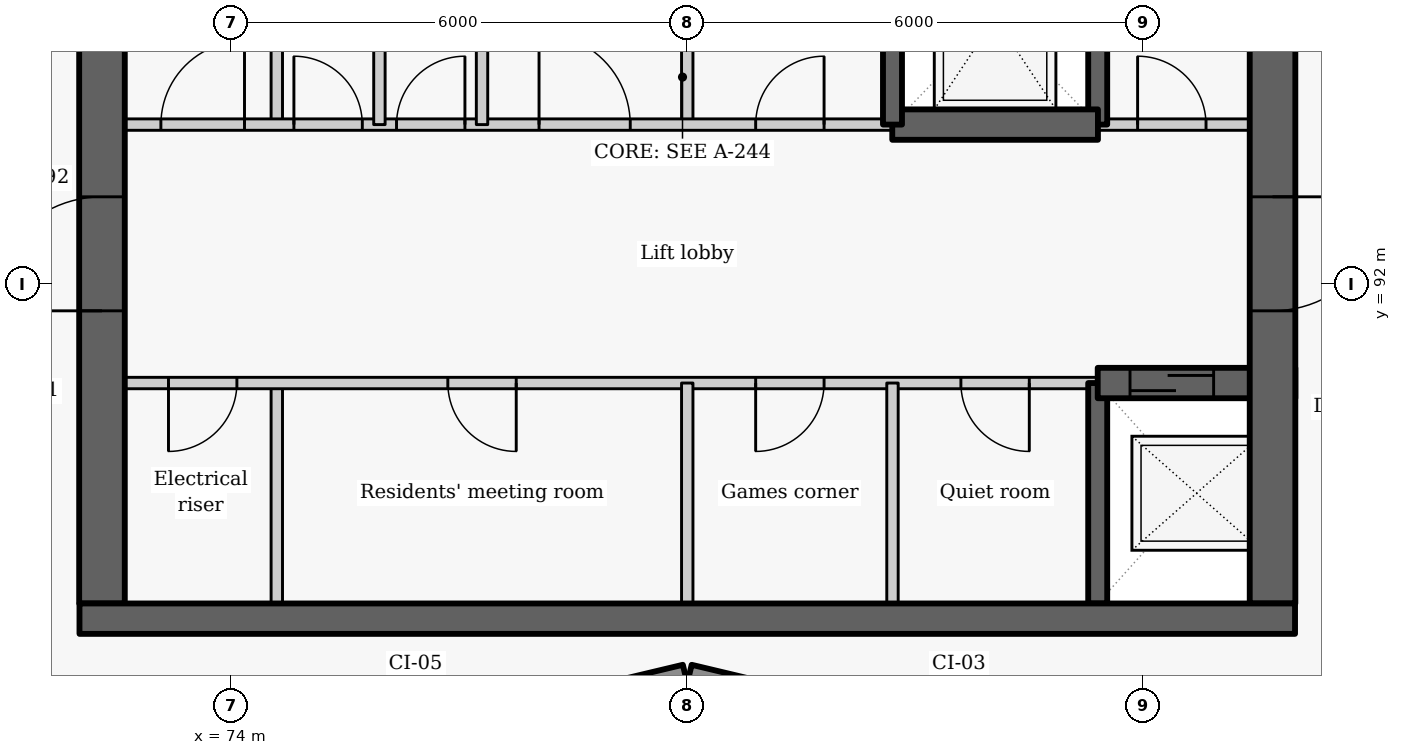
"""IFC4 building model, lengths in metres.
Left out: names, types, materials, properties, quantities, classifications, styles, units other than length and angle.
Written with IfcOpenShell. Run it as: python <this file> out.ifc"""

import sys

from ifc_helpers import new_model, si_unit, direction, frame, frame_2d, origin, place, context, subcontext, project, spatial, rectangle, extrude, element, fill, save


model = new_model("IFC4")
c1 = context("Model", 3, precision=1e-05, world=origin(), true_north=direction((0.0, 1.0)))
c2 = subcontext(c1, "Body", "Model", "MODEL_VIEW")
j1 = project(units=[si_unit("LENGTHUNIT", "METRE"), si_unit("PLANEANGLEUNIT", "RADIAN")], contexts=[c1])
p1 = place(None, origin())
s1 = spatial("IfcSite", under=j1, at=p1, CompositionType="ELEMENT")
p2 = place(p1, origin())
s2 = spatial("IfcBuilding", under=s1, at=p2, CompositionType="ELEMENT")
p3 = place(p2, frame((0.0, 0.0, 269.1)))
s3 = spatial("IfcBuildingStorey", under=s2, at=p3, CompositionType="ELEMENT", Elevation=269.1)
for number, where, z_axis, x_axis in (
    (1, (76.814, 86.119, 0.0), (0.0, 0.0, 1.0), (0.973, 0.232, 0.0)),
    (2, (80.029, 86.872, 0.0), (0.0, 0.0, 1.0), (0.973, -0.232, 0.0)),
):
    element("IfcWall", number, at=place(p3, frame(where, z_axis=z_axis, x_axis=x_axis)), inside=s3, PredefinedType="SOLIDWALL", context=c2, shape_type="SweptSolid", body=[
        extrude(rectangle(XDim=3.246, YDim=0.25, at=frame_2d((1.623, 0.0))), origin(), (0.0, 0.0, 1.0), 2.125),
    ])
p4 = place(p3, frame((74.6, 87.8, 0.0), z_axis=(0.0, 0.0, 1.0), x_axis=(0.0, 1.0, 0.0)))
e3 = element("IfcWall", 3, at=p4, inside=s3, PredefinedType="PARTITIONING", context=c2, shape_type="SweptSolid", body=[
    extrude(rectangle(XDim=2.9, YDim=0.15, at=frame_2d((1.45, 0.0))), origin(), (0.0, 0.0, 1.0), 3.025),
])
p5 = place(p3, frame((74.6, 94.1, 0.0), z_axis=(0.0, 0.0, 1.0), x_axis=(0.0, 1.0, 0.0)))
e4 = element("IfcWall", 4, at=p5, inside=s3, PredefinedType="PARTITIONING", context=c2, shape_type="SweptSolid", body=[
    extrude(rectangle(XDim=2.8, YDim=0.15, at=frame_2d((1.4, 0.0))), origin(), (0.0, 0.0, 1.0), 3.025),
])
p6 = place(p3, frame((85.4, 90.7, 0.0), z_axis=(0.0, 0.0, 1.0), x_axis=(-1.0, 0.0, 0.0)))
e5 = element("IfcWall", 5, at=p6, inside=s3, PredefinedType="PARTITIONING", context=c2, shape_type="SweptSolid", body=[
    extrude(rectangle(XDim=13.4, YDim=0.15, at=frame_2d((6.7, 0.0))), origin(), (0.0, 0.0, 1.0), 3.025),
])
p7 = place(p6, frame((11.325, 0.0, 0.0)))
e6 = element("IfcOpeningElement", 6, at=p7, cuts=e5, PredefinedType="OPENING", context=c2, shape_type="SweptSolid", body=[
    extrude(rectangle(XDim=0.9, YDim=2.1, at=frame_2d((0.45, 1.05))), frame((0.0, 0.085, 0.0), z_axis=(0.0, -1.0, 0.0), x_axis=(1.0, 0.0, 0.0)), (0.0, 0.0, 1.0), 0.17),
])
p8 = place(p6, frame((7.65, 0.0, 0.0)))
e7 = element("IfcOpeningElement", 7, at=p8, cuts=e5, PredefinedType="OPENING", context=c2, shape_type="SweptSolid", body=[
    extrude(rectangle(XDim=0.9, YDim=2.1, at=frame_2d((0.45, 1.05))), frame((0.0, 0.085, 0.0), z_axis=(0.0, -1.0, 0.0), x_axis=(1.0, 0.0, 0.0)), (0.0, 0.0, 1.0), 0.17),
])
p9 = place(p6, frame((3.6, 0.0, 0.0)))
e8 = element("IfcOpeningElement", 8, at=p9, cuts=e5, PredefinedType="OPENING", context=c2, shape_type="SweptSolid", body=[
    extrude(rectangle(XDim=0.9, YDim=2.1, at=frame_2d((0.45, 1.05))), frame((0.0, 0.085, 0.0), z_axis=(0.0, -1.0, 0.0), x_axis=(1.0, 0.0, 0.0)), (0.0, 0.0, 1.0), 0.17),
])
p10 = place(p6, frame((0.9, 0.0, 0.0)))
e9 = element("IfcOpeningElement", 9, at=p10, cuts=e5, PredefinedType="OPENING", context=c2, shape_type="SweptSolid", body=[
    extrude(rectangle(XDim=0.9, YDim=2.1, at=frame_2d((0.45, 1.05))), frame((0.0, 0.085, 0.0), z_axis=(0.0, -1.0, 0.0), x_axis=(1.0, 0.0, 0.0)), (0.0, 0.0, 1.0), 0.17),
])
p11 = place(p3, frame((72.3, 87.8, -0.275), z_axis=(0.0, 0.0, 1.0), x_axis=(0.0, 1.0, 0.0)))
e10 = element("IfcWall", 10, at=p11, inside=s3, PredefinedType="SHEAR", context=c2, shape_type="SweptSolid", body=[
    extrude(rectangle(XDim=9.1, YDim=0.6, at=frame_2d((4.55, 0.0))), origin(), (0.0, 0.0, 1.0), 3.3),
])
p12 = place(p11, frame((3.85, 0.0, 0.275)))
e11 = element("IfcOpeningElement", 11, at=p12, cuts=e10, PredefinedType="OPENING", context=c2, shape_type="SweptSolid", body=[
    extrude(rectangle(XDim=1.5, YDim=2.1, at=frame_2d((0.75, 1.05))), frame((0.0, 0.31, 0.0), z_axis=(0.0, -1.0, 0.0), x_axis=(1.0, 0.0, 0.0)), (0.0, 0.0, 1.0), 0.62),
])
p13 = place(p3, frame((85.4, 87.8, -0.275), z_axis=(0.0, 0.0, 1.0), x_axis=(0.0, 1.0, 0.0)))
e12 = element("IfcWall", 12, at=p13, inside=s3, PredefinedType="SHEAR", context=c2, shape_type="SweptSolid", body=[
    extrude(rectangle(XDim=2.9, YDim=0.25, at=frame_2d((1.45, 0.0))), origin(), (0.0, 0.0, 1.0), 3.3),
])
p14 = place(p3, frame((85.4, 94.1, -0.275), z_axis=(0.0, 0.0, 1.0), x_axis=(0.0, 1.0, 0.0)))
e13 = element("IfcWall", 13, at=p14, inside=s3, PredefinedType="SHEAR", context=c2, shape_type="SweptSolid", body=[
    extrude(rectangle(XDim=2.8, YDim=0.25, at=frame_2d((1.4, 0.0))), origin(), (0.0, 0.0, 1.0), 3.3),
])
p15 = place(p3, frame((85.4, 90.7, -0.275), z_axis=(0.0, 0.0, 1.0), x_axis=(1.0, 0.0, 0.0)))
e14 = element("IfcWall", 14, at=p15, inside=s3, PredefinedType="SHEAR", context=c2, shape_type="SweptSolid", body=[
    extrude(rectangle(XDim=2.6, YDim=0.4, at=frame_2d((1.3, 0.0))), origin(), (0.0, 0.0, 1.0), 3.3),
])
p16 = place(p15, frame((0.425, 0.0, 0.275)))
e15 = element("IfcOpeningElement", 15, at=p16, cuts=e14, PredefinedType="OPENING", context=c2, shape_type="SweptSolid", body=[
    extrude(rectangle(XDim=1.1, YDim=2.1, at=frame_2d((0.55, 1.05))), frame((0.0, 0.21, 0.0), z_axis=(0.0, -1.0, 0.0), x_axis=(1.0, 0.0, 0.0)), (0.0, 0.0, 1.0), 0.42),
])
p17 = place(p3, frame((87.7, 102.05, -0.275), z_axis=(0.0, 0.0, 1.0), x_axis=(0.0, -1.0, 0.0)))
e16 = element("IfcWall", 16, at=p17, inside=s3, PredefinedType="SHEAR", context=c2, shape_type="SweptSolid", body=[
    extrude(rectangle(XDim=14.25, YDim=0.6, at=frame_2d((7.125, 0.0))), origin(), (0.0, 0.0, 1.0), 3.3),
])
p18 = place(p17, frame((8.9, 0.0, 0.275)))
e17 = element("IfcOpeningElement", 17, at=p18, cuts=e16, PredefinedType="OPENING", context=c2, shape_type="SweptSolid", body=[
    extrude(rectangle(XDim=1.5, YDim=2.1, at=frame_2d((0.75, 1.05))), frame((0.0, 0.31, 0.0), z_axis=(0.0, -1.0, 0.0), x_axis=(1.0, 0.0, 0.0)), (0.0, 0.0, 1.0), 0.62),
])
p19 = place(p17, frame((2.025, 0.0, 0.275)))
e18 = element("IfcOpeningElement", 18, at=p19, cuts=e16, PredefinedType="OPENING", context=c2, shape_type="SweptSolid", body=[
    extrude(rectangle(XDim=1.1, YDim=2.1, at=frame_2d((0.55, 1.05))), frame((0.0, 0.31, 0.0), z_axis=(0.0, -1.0, 0.0), x_axis=(1.0, 0.0, 0.0)), (0.0, 0.0, 1.0), 0.62),
])
p20 = place(p3, frame((80.0, 87.8, 0.0), z_axis=(0.0, 0.0, 1.0), x_axis=(0.0, 1.0, 0.0)))
e19 = element("IfcWall", 19, at=p20, inside=s3, PredefinedType="PARTITIONING", context=c2, shape_type="SweptSolid", body=[
    extrude(rectangle(XDim=2.9, YDim=0.15, at=frame_2d((1.45, 0.0))), origin(), (0.0, 0.0, 1.0), 3.025),
])
p21 = place(p3, frame((80.0, 94.1, 0.0), z_axis=(0.0, 0.0, 1.0), x_axis=(0.0, 1.0, 0.0)))
e20 = element("IfcWall", 20, at=p21, inside=s3, PredefinedType="PARTITIONING", context=c2, shape_type="SweptSolid", body=[
    extrude(rectangle(XDim=2.8, YDim=0.15, at=frame_2d((1.4, 0.0))), origin(), (0.0, 0.0, 1.0), 3.025),
])
p22 = place(p3, frame((82.7, 87.8, 0.0), z_axis=(0.0, 0.0, 1.0), x_axis=(0.0, 1.0, 0.0)))
e21 = element("IfcWall", 21, at=p22, inside=s3, PredefinedType="PARTITIONING", context=c2, shape_type="SweptSolid", body=[
    extrude(rectangle(XDim=2.9, YDim=0.15, at=frame_2d((1.45, 0.0))), origin(), (0.0, 0.0, 1.0), 3.025),
])
p23 = place(p3, frame((72.0, 94.1, 0.0), z_axis=(0.0, 0.0, 1.0), x_axis=(1.0, 0.0, 0.0)))
e22 = element("IfcWall", 22, at=p23, inside=s3, PredefinedType="PARTITIONING", context=c2, shape_type="SweptSolid", body=[
    extrude(rectangle(XDim=10.703, YDim=0.15, at=frame_2d((5.352, 0.0))), origin(), (0.0, 0.0, 1.0), 3.025),
])
p24 = place(p23, frame((1.075, 0.0, 0.0)))
e23 = element("IfcOpeningElement", 23, at=p24, cuts=e22, PredefinedType="OPENING", context=c2, shape_type="SweptSolid", body=[
    extrude(rectangle(XDim=1.1, YDim=2.1, at=frame_2d((0.55, 1.05))), frame((0.0, 0.085, 0.0), z_axis=(0.0, -1.0, 0.0), x_axis=(1.0, 0.0, 0.0)), (0.0, 0.0, 1.0), 0.17),
])
p25 = place(p23, frame((2.825, 0.0, 0.0)))
e24 = element("IfcOpeningElement", 24, at=p25, cuts=e22, PredefinedType="OPENING", context=c2, shape_type="SweptSolid", body=[
    extrude(rectangle(XDim=0.9, YDim=2.1, at=frame_2d((0.45, 1.05))), frame((0.0, 0.085, 0.0), z_axis=(0.0, -1.0, 0.0), x_axis=(1.0, 0.0, 0.0)), (0.0, 0.0, 1.0), 0.17),
])
p26 = place(p23, frame((4.175, 0.0, 0.0)))
e25 = element("IfcOpeningElement", 25, at=p26, cuts=e22, PredefinedType="OPENING", context=c2, shape_type="SweptSolid", body=[
    extrude(rectangle(XDim=0.9, YDim=2.1, at=frame_2d((0.45, 1.05))), frame((0.0, 0.085, 0.0), z_axis=(0.0, -1.0, 0.0), x_axis=(1.0, 0.0, 0.0)), (0.0, 0.0, 1.0), 0.17),
])
p27 = place(p23, frame((6.05, 0.0, 0.0)))
e26 = element("IfcOpeningElement", 26, at=p27, cuts=e22, PredefinedType="OPENING", context=c2, shape_type="SweptSolid", body=[
    extrude(rectangle(XDim=1.2, YDim=2.1, at=frame_2d((0.6, 1.05))), frame((0.0, 0.085, 0.0), z_axis=(0.0, -1.0, 0.0), x_axis=(1.0, 0.0, 0.0)), (0.0, 0.0, 1.0), 0.17),
])
p28 = place(p23, frame((8.9, 0.0, 0.0)))
e27 = element("IfcOpeningElement", 27, at=p28, cuts=e22, PredefinedType="OPENING", context=c2, shape_type="SweptSolid", body=[
    extrude(rectangle(XDim=0.9, YDim=2.1, at=frame_2d((0.45, 1.05))), frame((0.0, 0.085, 0.0), z_axis=(0.0, -1.0, 0.0), x_axis=(1.0, 0.0, 0.0)), (0.0, 0.0, 1.0), 0.17),
])
p29 = place(p3, frame((85.397, 94.1, 0.0), z_axis=(0.0, 0.0, 1.0), x_axis=(1.0, 0.0, 0.0)))
e28 = element("IfcWall", 28, at=p29, inside=s3, PredefinedType="PARTITIONING", context=c2, shape_type="SweptSolid", body=[
    extrude(rectangle(XDim=2.603, YDim=0.15, at=frame_2d((1.302, 0.0))), origin(), (0.0, 0.0, 1.0), 3.025),
])
p30 = place(p29, frame((0.528, 0.0, 0.0)))
e29 = element("IfcOpeningElement", 29, at=p30, cuts=e28, PredefinedType="OPENING", context=c2, shape_type="SweptSolid", body=[
    extrude(rectangle(XDim=0.9, YDim=2.1, at=frame_2d((0.45, 1.05))), frame((0.0, 0.085, 0.0), z_axis=(0.0, -1.0, 0.0), x_axis=(1.0, 0.0, 0.0)), (0.0, 0.0, 1.0), 0.17),
])
p31 = place(p3, frame((82.697, 94.1, -0.275), z_axis=(0.0, 0.0, 1.0), x_axis=(1.0, 0.0, 0.0)))
e30 = element("IfcWall", 30, at=p31, inside=s3, PredefinedType="SHEAR", context=c2, shape_type="SweptSolid", body=[
    extrude(rectangle(XDim=2.706, YDim=0.4, at=frame_2d((1.353, 0.0))), origin(), (0.0, 0.0, 1.0), 3.3),
])
for number, where, z_axis, x_axis in (
    (31, (75.95, 94.1, 0.0), (0.0, 0.0, 1.0), (0.0, 1.0, 0.0)),
    (32, (77.3, 94.1, 0.0), (0.0, 0.0, 1.0), (0.0, 1.0, 0.0)),
):
    element("IfcWall", number, at=place(p3, frame(where, z_axis=z_axis, x_axis=x_axis)), inside=s3, PredefinedType="PARTITIONING", context=c2, shape_type="SweptSolid", body=[
        extrude(rectangle(XDim=2.8, YDim=0.15, at=frame_2d((1.4, 0.0))), origin(), (0.0, 0.0, 1.0), 3.025),
    ])
p32 = place(p3, frame((82.7, 94.1, -0.275), z_axis=(0.0, 0.0, 1.0), x_axis=(0.0, 1.0, 0.0)))
e33 = element("IfcWall", 33, at=p32, inside=s3, PredefinedType="SHEAR", context=c2, shape_type="SweptSolid", body=[
    extrude(rectangle(XDim=2.8, YDim=0.25, at=frame_2d((1.4, 0.0))), origin(), (0.0, 0.0, 1.0), 3.3),
])
p33 = place(p3, frame((72.004, 87.6, -0.275), z_axis=(0.0, 0.0, 1.0), x_axis=(1.0, 0.0, 0.0)))
e34 = element("IfcWall", 34, at=p33, inside=s3, PredefinedType="SHEAR", context=c2, shape_type="SweptSolid", body=[
    extrude(rectangle(XDim=15.992, YDim=0.4, at=frame_2d((7.996, 0.0))), origin(), (0.0, 0.0, 1.0), 3.3),
])
p34 = place(p7, origin())
e35 = element("IfcDoor", 35, at=p34, inside=s3, OperationType="SINGLE_SWING_RIGHT", PredefinedType="DOOR", context=c2, shape_type="SweptSolid", body=[
    extrude(rectangle(XDim=0.9, YDim=2.1, at=frame_2d((0.45, 1.05))), frame((0.0, 0.025, 0.0), z_axis=(0.0, -1.0, 0.0), x_axis=(1.0, 0.0, 0.0)), (0.0, 0.0, 1.0), 0.05),
])
fill(e6, e35)
p35 = place(p16, origin())
e36 = element("IfcDoor", 36, at=p35, inside=s3, OperationType="SLIDING_TO_LEFT", PredefinedType="DOOR", context=c2, shape_type="SweptSolid", body=[
    extrude(rectangle(XDim=1.1, YDim=2.1, at=frame_2d((0.55, 1.05))), frame((0.0, 0.025, 0.0), z_axis=(0.0, -1.0, 0.0), x_axis=(1.0, 0.0, 0.0)), (0.0, 0.0, 1.0), 0.05),
])
fill(e15, e36)
p36 = place(p8, origin())
e37 = element("IfcDoor", 37, at=p36, inside=s3, OperationType="SINGLE_SWING_LEFT", PredefinedType="DOOR", context=c2, shape_type="SweptSolid", body=[
    extrude(rectangle(XDim=0.9, YDim=2.1, at=frame_2d((0.45, 1.05))), frame((0.0, 0.025, 0.0), z_axis=(0.0, -1.0, 0.0), x_axis=(1.0, 0.0, 0.0)), (0.0, 0.0, 1.0), 0.05),
])
fill(e7, e37)
p37 = place(p9, origin())
e38 = element("IfcDoor", 38, at=p37, inside=s3, OperationType="SINGLE_SWING_RIGHT", PredefinedType="DOOR", context=c2, shape_type="SweptSolid", body=[
    extrude(rectangle(XDim=0.9, YDim=2.1, at=frame_2d((0.45, 1.05))), frame((0.0, 0.025, 0.0), z_axis=(0.0, -1.0, 0.0), x_axis=(1.0, 0.0, 0.0)), (0.0, 0.0, 1.0), 0.05),
])
fill(e8, e38)
p38 = place(p10, origin())
e39 = element("IfcDoor", 39, at=p38, inside=s3, OperationType="SINGLE_SWING_LEFT", PredefinedType="DOOR", context=c2, shape_type="SweptSolid", body=[
    extrude(rectangle(XDim=0.9, YDim=2.1, at=frame_2d((0.45, 1.05))), frame((0.0, 0.025, 0.0), z_axis=(0.0, -1.0, 0.0), x_axis=(1.0, 0.0, 0.0)), (0.0, 0.0, 1.0), 0.05),
])
fill(e9, e39)
p39 = place(p24, origin())
e40 = element("IfcDoor", 40, at=p39, inside=s3, OperationType="SINGLE_SWING_RIGHT", PredefinedType="DOOR", context=c2, shape_type="SweptSolid", body=[
    extrude(rectangle(XDim=1.1, YDim=2.1, at=frame_2d((0.55, 1.05))), frame((0.0, 0.025, 0.0), z_axis=(0.0, -1.0, 0.0), x_axis=(1.0, 0.0, 0.0)), (0.0, 0.0, 1.0), 0.05),
])
fill(e23, e40)
p40 = place(p25, origin())
e41 = element("IfcDoor", 41, at=p40, inside=s3, OperationType="SINGLE_SWING_LEFT", PredefinedType="DOOR", context=c2, shape_type="SweptSolid", body=[
    extrude(rectangle(XDim=0.9, YDim=2.1, at=frame_2d((0.45, 1.05))), frame((0.0, 0.025, 0.0), z_axis=(0.0, -1.0, 0.0), x_axis=(1.0, 0.0, 0.0)), (0.0, 0.0, 1.0), 0.05),
])
fill(e24, e41)
p41 = place(p26, origin())
e42 = element("IfcDoor", 42, at=p41, inside=s3, OperationType="SINGLE_SWING_RIGHT", PredefinedType="DOOR", context=c2, shape_type="SweptSolid", body=[
    extrude(rectangle(XDim=0.9, YDim=2.1, at=frame_2d((0.45, 1.05))), frame((0.0, 0.025, 0.0), z_axis=(0.0, -1.0, 0.0), x_axis=(1.0, 0.0, 0.0)), (0.0, 0.0, 1.0), 0.05),
])
fill(e25, e42)
p42 = place(p27, origin())
e43 = element("IfcDoor", 43, at=p42, inside=s3, OperationType="DOUBLE_DOOR_SINGLE_SWING", PredefinedType="DOOR", context=c2, shape_type="SweptSolid", body=[
    extrude(rectangle(XDim=1.2, YDim=2.1, at=frame_2d((0.6, 1.05))), frame((0.0, 0.025, 0.0), z_axis=(0.0, -1.0, 0.0), x_axis=(1.0, 0.0, 0.0)), (0.0, 0.0, 1.0), 0.05),
])
fill(e26, e43)
p43 = place(p28, origin())
e44 = element("IfcDoor", 44, at=p43, inside=s3, OperationType="SINGLE_SWING_RIGHT", PredefinedType="DOOR", context=c2, shape_type="SweptSolid", body=[
    extrude(rectangle(XDim=0.9, YDim=2.1, at=frame_2d((0.45, 1.05))), frame((0.0, 0.025, 0.0), z_axis=(0.0, -1.0, 0.0), x_axis=(1.0, 0.0, 0.0)), (0.0, 0.0, 1.0), 0.05),
])
fill(e27, e44)
p44 = place(p30, origin())
e45 = element("IfcDoor", 45, at=p44, inside=s3, OperationType="SINGLE_SWING_LEFT", PredefinedType="DOOR", context=c2, shape_type="SweptSolid", body=[
    extrude(rectangle(XDim=0.9, YDim=2.1, at=frame_2d((0.45, 1.05))), frame((0.0, 0.025, 0.0), z_axis=(0.0, -1.0, 0.0), x_axis=(1.0, 0.0, 0.0)), (0.0, 0.0, 1.0), 0.05),
])
fill(e29, e45)
p45 = place(p18, origin())
e46 = element("IfcDoor", 46, at=p45, inside=s3, OperationType="DOUBLE_DOOR_SINGLE_SWING", PredefinedType="DOOR", context=c2, shape_type="SweptSolid", body=[
    extrude(rectangle(XDim=1.5, YDim=2.1, at=frame_2d((0.75, 1.05))), frame((0.0, 0.025, 0.0), z_axis=(0.0, -1.0, 0.0), x_axis=(1.0, 0.0, 0.0)), (0.0, 0.0, 1.0), 0.05),
])
fill(e17, e46)
p46 = place(p12, origin())
e47 = element("IfcDoor", 47, at=p46, inside=s3, OperationType="DOUBLE_DOOR_SINGLE_SWING", PredefinedType="DOOR", context=c2, shape_type="SweptSolid", body=[
    extrude(rectangle(XDim=1.5, YDim=2.1, at=frame_2d((0.75, 1.05))), frame((0.0, 0.025, 0.0), z_axis=(0.0, -1.0, 0.0), x_axis=(1.0, 0.0, 0.0)), (0.0, 0.0, 1.0), 0.05),
])
fill(e11, e47)
save(model, sys.argv[1])
